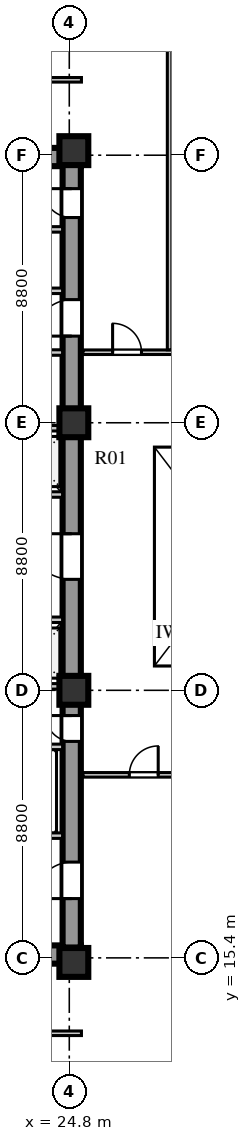
"""IFC4 building model, lengths in metres.
Left out: names, types, materials, properties, quantities, classifications, styles, units other than length and angle.
Written with IfcOpenShell. Run it as: python <this file> out.ifc"""

import sys

from ifc_helpers import new_model, si_unit, direction, frame, frame_2d, origin, origin_2d, place, context, subcontext, project, spatial, rectangle, extrude, element, fill, save


model = new_model("IFC4")
c1 = context("Model", 3, precision=1e-05, world=origin(), true_north=direction((0.0, 1.0)))
c2 = subcontext(c1, "Body", "Model", "MODEL_VIEW")
j1 = project(units=[si_unit("LENGTHUNIT", "METRE"), si_unit("PLANEANGLEUNIT", "RADIAN")], contexts=[c1])
p1 = place(None, origin())
s1 = spatial("IfcSite", under=j1, at=p1, CompositionType="ELEMENT")
p2 = place(p1, origin())
s2 = spatial("IfcBuilding", under=s1, at=p2, CompositionType="ELEMENT")
p3 = place(p2, frame((0.0, 0.0, 50.0)))
s3 = spatial("IfcBuildingStorey", under=s2, at=p3, CompositionType="ELEMENT", Elevation=50.0)
for number, where, z_axis, x_axis in (
    (1, (15.3, 15.51, 0.0), (0.0, 0.0, 1.0), (1.0, 0.0, 0.0)),
    (2, (15.3, 41.74, 0.0), (0.0, 0.0, 1.0), (1.0, 0.0, 0.0)),
):
    element("IfcWall", number, at=place(p3, frame(where, z_axis=z_axis, x_axis=x_axis)), inside=s3, PredefinedType="SHEAR", context=c2, shape_type="SweptSolid", body=[
        extrude(rectangle(XDim=9.88, YDim=0.6, at=frame_2d((4.94, 0.0))), origin(), (0.0, 0.0, 1.0), 3.72),
    ])
p4 = place(p3, frame((24.88, 15.74, 0.0), z_axis=(0.0, 0.0, 1.0), x_axis=(0.0, 1.0, 0.0)))
e3 = element("IfcWall", 3, at=p4, inside=s3, PredefinedType="SHEAR", context=c2, shape_type="SweptSolid", body=[
    extrude(rectangle(XDim=25.76, YDim=0.6, at=frame_2d((12.88, 0.0))), origin(), (0.0, 0.0, 1.0), 3.72),
])
p5 = place(p4, frame((1.61, 0.0, 0.0)))
e4 = element("IfcOpeningElement", 4, at=p5, cuts=e3, PredefinedType="OPENING", context=c2, shape_type="SweptSolid", body=[
    extrude(rectangle(XDim=1.2, YDim=2.1, at=frame_2d((0.6, 1.05))), frame((0.0, 0.31, 0.0), z_axis=(0.0, -1.0, 0.0), x_axis=(1.0, 0.0, 0.0)), (0.0, 0.0, 1.0), 0.62),
])
p6 = place(p4, frame((6.78, 0.0, 0.0)))
e5 = element("IfcOpeningElement", 5, at=p6, cuts=e3, PredefinedType="OPENING", context=c2, shape_type="SweptSolid", body=[
    extrude(rectangle(XDim=0.85, YDim=2.06, at=frame_2d((0.425, 1.03))), frame((0.0, 0.31, 0.0), z_axis=(0.0, -1.0, 0.0), x_axis=(1.0, 0.0, 0.0)), (0.0, 0.0, 1.0), 0.62),
])
p7 = place(p4, frame((12.11, 0.0, 0.0)))
e6 = element("IfcOpeningElement", 6, at=p7, cuts=e3, PredefinedType="OPENING", context=c2, shape_type="SweptSolid", body=[
    extrude(rectangle(XDim=1.5, YDim=2.12, at=frame_2d((0.75, 1.06))), frame((0.0, 0.31, 0.0), z_axis=(0.0, -1.0, 0.0), x_axis=(1.0, 0.0, 0.0)), (0.0, 0.0, 1.0), 0.62),
])
p8 = place(p4, frame((20.11, 0.0, 0.0)))
e7 = element("IfcOpeningElement", 7, at=p8, cuts=e3, PredefinedType="OPENING", context=c2, shape_type="SweptSolid", body=[
    extrude(rectangle(XDim=1.2, YDim=2.12, at=frame_2d((0.6, 1.06))), frame((0.0, 0.31, 0.0), z_axis=(0.0, -1.0, 0.0), x_axis=(1.0, 0.0, 0.0)), (0.0, 0.0, 1.0), 0.62),
])
p9 = place(p4, frame((24.01, 0.0, 0.0)))
e8 = element("IfcOpeningElement", 8, at=p9, cuts=e3, PredefinedType="OPENING", context=c2, shape_type="SweptSolid", body=[
    extrude(rectangle(XDim=0.95, YDim=2.1, at=frame_2d((0.475, 1.05))), frame((0.0, 0.31, 0.0), z_axis=(0.0, -1.0, 0.0), x_axis=(1.0, 0.0, 0.0)), (0.0, 0.0, 1.0), 0.62),
])
for number, where, z_axis, x_axis in (
    (9, (24.95, 15.25, 0.0), (0.0, 0.0, 1.0), (1.0, 0.0, 0.0)),
    (10, (24.95, 24.2, 0.0), (0.0, 0.0, 1.0), (1.0, 0.0, 0.0)),
    (11, (24.95, 33.0, 0.0), (0.0, 0.0, 1.0), (1.0, 0.0, 0.0)),
    (12, (24.95, 41.95, 0.0), (0.0, 0.0, 1.0), (1.0, 0.0, 0.0)),
):
    element("IfcColumn", number, at=place(p3, frame(where, z_axis=z_axis, x_axis=x_axis)), inside=s3, PredefinedType="COLUMN", context=c2, shape_type="SweptSolid", body=[
        extrude(rectangle(XDim=0.95, YDim=0.95, at=origin_2d()), origin(), (0.0, 0.0, 1.0), 3.72),
    ])
p10 = place(p3, frame((19.64, 19.42, 0.0), z_axis=(0.0, 0.0, 1.0), x_axis=(1.0, 0.0, 0.0)))
e13 = element("IfcWall", 13, at=p10, inside=s3, PredefinedType="SOLIDWALL", context=c2, shape_type="SweptSolid", body=[
    extrude(rectangle(XDim=4.94, YDim=0.18, at=frame_2d((2.47, 0.0))), origin(), (0.0, 0.0, 1.0), 3.72),
])
p11 = place(p10, frame((0.72, 0.0, 0.0)))
e14 = element("IfcOpeningElement", 14, at=p11, cuts=e13, PredefinedType="OPENING", context=c2, shape_type="SweptSolid", body=[
    extrude(rectangle(XDim=1.1, YDim=2.1, at=frame_2d((0.55, 1.05))), frame((0.0, 0.1, 0.0), z_axis=(0.0, -1.0, 0.0), x_axis=(1.0, 0.0, 0.0)), (0.0, 0.0, 1.0), 0.2),
])
p12 = place(p10, frame((3.02, 0.0, 0.0)))
e15 = element("IfcOpeningElement", 15, at=p12, cuts=e13, PredefinedType="OPENING", context=c2, shape_type="SweptSolid", body=[
    extrude(rectangle(XDim=1.1, YDim=2.1, at=frame_2d((0.55, 1.05))), frame((0.0, 0.1, 0.0), z_axis=(0.0, -1.0, 0.0), x_axis=(1.0, 0.0, 0.0)), (0.0, 0.0, 1.0), 0.2),
])
p13 = place(p3, frame((19.64, 22.34, 0.0), z_axis=(0.0, 0.0, 1.0), x_axis=(1.0, 0.0, 0.0)))
e16 = element("IfcWall", 16, at=p13, inside=s3, PredefinedType="SOLIDWALL", context=c2, shape_type="SweptSolid", body=[
    extrude(rectangle(XDim=4.94, YDim=0.18, at=frame_2d((2.47, 0.0))), origin(), (0.0, 0.0, 1.0), 3.72),
])
p14 = place(p3, frame((15.9, 26.52, 0.0), z_axis=(0.0, 0.0, 1.0), x_axis=(1.0, 0.0, 0.0)))
e17 = element("IfcWall", 17, at=p14, inside=s3, PredefinedType="SOLIDWALL", context=c2, shape_type="SweptSolid", body=[
    extrude(rectangle(XDim=8.68, YDim=0.18, at=frame_2d((4.34, 0.0))), origin(), (0.0, 0.0, 1.0), 3.72),
])
p15 = place(p14, frame((1.76, 0.0, 0.0)))
e18 = element("IfcOpeningElement", 18, at=p15, cuts=e17, PredefinedType="OPENING", context=c2, shape_type="SweptSolid", body=[
    extrude(rectangle(XDim=1.0, YDim=2.1, at=frame_2d((0.5, 1.05))), frame((0.0, 0.1, 0.0), z_axis=(0.0, -1.0, 0.0), x_axis=(1.0, 0.0, 0.0)), (0.0, 0.0, 1.0), 0.2),
])
p16 = place(p14, frame((3.6, 0.0, 0.0)))
e19 = element("IfcOpeningElement", 19, at=p16, cuts=e17, PredefinedType="OPENING", context=c2, shape_type="SweptSolid", body=[
    extrude(rectangle(XDim=1.0, YDim=2.1, at=frame_2d((0.5, 1.05))), frame((0.0, 0.1, 0.0), z_axis=(0.0, -1.0, 0.0), x_axis=(1.0, 0.0, 0.0)), (0.0, 0.0, 1.0), 0.2),
])
p17 = place(p14, frame((5.44, 0.0, 0.0)))
e20 = element("IfcOpeningElement", 20, at=p17, cuts=e17, PredefinedType="OPENING", context=c2, shape_type="SweptSolid", body=[
    extrude(rectangle(XDim=1.0, YDim=2.1, at=frame_2d((0.5, 1.05))), frame((0.0, 0.1, 0.0), z_axis=(0.0, -1.0, 0.0), x_axis=(1.0, 0.0, 0.0)), (0.0, 0.0, 1.0), 0.2),
])
p18 = place(p14, frame((7.28, 0.0, 0.0)))
e21 = element("IfcOpeningElement", 21, at=p18, cuts=e17, PredefinedType="OPENING", context=c2, shape_type="SweptSolid", body=[
    extrude(rectangle(XDim=1.0, YDim=2.1, at=frame_2d((0.5, 1.05))), frame((0.0, 0.1, 0.0), z_axis=(0.0, -1.0, 0.0), x_axis=(1.0, 0.0, 0.0)), (0.0, 0.0, 1.0), 0.2),
])
p19 = place(p3, frame((15.9, 24.33, 0.0), z_axis=(0.0, 0.0, 1.0), x_axis=(1.0, 0.0, 0.0)))
e22 = element("IfcWall", 22, at=p19, inside=s3, PredefinedType="SOLIDWALL", context=c2, shape_type="SweptSolid", body=[
    extrude(rectangle(XDim=8.68, YDim=0.18, at=frame_2d((4.34, 0.0))), origin(), (0.0, 0.0, 1.0), 3.02),
])
p20 = place(p3, frame((15.9, 30.64, 0.0), z_axis=(0.0, 0.0, 1.0), x_axis=(1.0, 0.0, 0.0)))
e23 = element("IfcWall", 23, at=p20, inside=s3, PredefinedType="SOLIDWALL", context=c2, shape_type="SweptSolid", body=[
    extrude(rectangle(XDim=8.68, YDim=0.18, at=frame_2d((4.34, 0.0))), origin(), (0.0, 0.0, 1.0), 3.72),
])
p21 = place(p20, frame((1.76, 0.0, 0.0)))
e24 = element("IfcOpeningElement", 24, at=p21, cuts=e23, PredefinedType="OPENING", context=c2, shape_type="SweptSolid", body=[
    extrude(rectangle(XDim=1.0, YDim=2.1, at=frame_2d((0.5, 1.05))), frame((0.0, 0.1, 0.0), z_axis=(0.0, -1.0, 0.0), x_axis=(1.0, 0.0, 0.0)), (0.0, 0.0, 1.0), 0.2),
])
p22 = place(p20, frame((3.6, 0.0, 0.0)))
e25 = element("IfcOpeningElement", 25, at=p22, cuts=e23, PredefinedType="OPENING", context=c2, shape_type="SweptSolid", body=[
    extrude(rectangle(XDim=1.0, YDim=2.1, at=frame_2d((0.5, 1.05))), frame((0.0, 0.1, 0.0), z_axis=(0.0, -1.0, 0.0), x_axis=(1.0, 0.0, 0.0)), (0.0, 0.0, 1.0), 0.2),
])
p23 = place(p20, frame((5.44, 0.0, 0.0)))
e26 = element("IfcOpeningElement", 26, at=p23, cuts=e23, PredefinedType="OPENING", context=c2, shape_type="SweptSolid", body=[
    extrude(rectangle(XDim=1.0, YDim=2.1, at=frame_2d((0.5, 1.05))), frame((0.0, 0.1, 0.0), z_axis=(0.0, -1.0, 0.0), x_axis=(1.0, 0.0, 0.0)), (0.0, 0.0, 1.0), 0.2),
])
p24 = place(p20, frame((7.28, 0.0, 0.0)))
e27 = element("IfcOpeningElement", 27, at=p24, cuts=e23, PredefinedType="OPENING", context=c2, shape_type="SweptSolid", body=[
    extrude(rectangle(XDim=1.0, YDim=2.1, at=frame_2d((0.5, 1.05))), frame((0.0, 0.1, 0.0), z_axis=(0.0, -1.0, 0.0), x_axis=(1.0, 0.0, 0.0)), (0.0, 0.0, 1.0), 0.2),
])
p25 = place(p3, frame((15.9, 32.82, 0.0), z_axis=(0.0, 0.0, 1.0), x_axis=(1.0, 0.0, 0.0)))
e28 = element("IfcWall", 28, at=p25, inside=s3, PredefinedType="SOLIDWALL", context=c2, shape_type="SweptSolid", body=[
    extrude(rectangle(XDim=8.68, YDim=0.18, at=frame_2d((4.34, 0.0))), origin(), (0.0, 0.0, 1.0), 3.02),
])
p26 = place(p3, frame((22.02, 35.31, 0.0), z_axis=(0.0, 0.0, 1.0), x_axis=(1.0, 0.0, 0.0)))
e29 = element("IfcWall", 29, at=p26, inside=s3, PredefinedType="SOLIDWALL", context=c2, shape_type="SweptSolid", body=[
    extrude(rectangle(XDim=2.56, YDim=0.18, at=frame_2d((1.28, 0.0))), origin(), (0.0, 0.0, 1.0), 3.72),
])
p27 = place(p26, frame((0.55, 0.0, 0.0)))
e30 = element("IfcOpeningElement", 30, at=p27, cuts=e29, PredefinedType="OPENING", context=c2, shape_type="SweptSolid", body=[
    extrude(rectangle(XDim=1.0, YDim=2.1, at=frame_2d((0.5, 1.05))), frame((0.0, 0.1, 0.0), z_axis=(0.0, -1.0, 0.0), x_axis=(1.0, 0.0, 0.0)), (0.0, 0.0, 1.0), 0.2),
])
p28 = place(p3, frame((19.64, 37.34, 0.0), z_axis=(0.0, 0.0, 1.0), x_axis=(1.0, 0.0, 0.0)))
e31 = element("IfcWall", 31, at=p28, inside=s3, PredefinedType="SOLIDWALL", context=c2, shape_type="SweptSolid", body=[
    extrude(rectangle(XDim=4.94, YDim=0.18, at=frame_2d((2.47, 0.0))), origin(), (0.0, 0.0, 1.0), 3.72),
])
p29 = place(p28, frame((0.45, 0.0, 0.0)))
e32 = element("IfcOpeningElement", 32, at=p29, cuts=e31, PredefinedType="OPENING", context=c2, shape_type="SweptSolid", body=[
    extrude(rectangle(XDim=1.0, YDim=2.1, at=frame_2d((0.5, 1.05))), frame((0.0, 0.1, 0.0), z_axis=(0.0, -1.0, 0.0), x_axis=(1.0, 0.0, 0.0)), (0.0, 0.0, 1.0), 0.2),
])
p30 = place(p28, frame((2.5, 0.0, 0.0)))
e33 = element("IfcOpeningElement", 33, at=p30, cuts=e31, PredefinedType="OPENING", context=c2, shape_type="SweptSolid", body=[
    extrude(rectangle(XDim=1.0, YDim=2.1, at=frame_2d((0.5, 1.05))), frame((0.0, 0.1, 0.0), z_axis=(0.0, -1.0, 0.0), x_axis=(1.0, 0.0, 0.0)), (0.0, 0.0, 1.0), 0.2),
])
p31 = place(p3, frame((19.64, 39.36, 0.0), z_axis=(0.0, 0.0, 1.0), x_axis=(1.0, 0.0, 0.0)))
e34 = element("IfcWall", 34, at=p31, inside=s3, PredefinedType="SOLIDWALL", context=c2, shape_type="SweptSolid", body=[
    extrude(rectangle(XDim=4.94, YDim=0.18, at=frame_2d((2.47, 0.0))), origin(), (0.0, 0.0, 1.0), 3.72),
])
p32 = place(p3, frame((25.25, 21.42, 0.0), z_axis=(0.0, 0.0, 1.0), x_axis=(1.0, 0.0, 0.0)))
e35 = element("IfcWall", 35, at=p32, inside=s3, PredefinedType="PARTITIONING", context=c2, shape_type="SweptSolid", body=[
    extrude(rectangle(XDim=12.87, YDim=0.15, at=frame_2d((6.435, 0.0))), origin(), (0.0, 0.0, 1.0), 3.32),
])
p33 = place(p32, frame((1.525, 0.0, 0.0)))
e36 = element("IfcOpeningElement", 36, at=p33, cuts=e35, PredefinedType="OPENING", context=c2, shape_type="SweptSolid", body=[
    extrude(rectangle(XDim=0.95, YDim=2.08, at=frame_2d((0.475, 1.04))), frame((0.0, 0.085, 0.0), z_axis=(0.0, -1.0, 0.0), x_axis=(1.0, 0.0, 0.0)), (0.0, 0.0, 1.0), 0.17),
])
p34 = place(p32, frame((5.775, 0.0, 0.0)))
e37 = element("IfcOpeningElement", 37, at=p34, cuts=e35, PredefinedType="OPENING", context=c2, shape_type="SweptSolid", body=[
    extrude(rectangle(XDim=0.95, YDim=2.08, at=frame_2d((0.475, 1.04))), frame((0.0, 0.085, 0.0), z_axis=(0.0, -1.0, 0.0), x_axis=(1.0, 0.0, 0.0)), (0.0, 0.0, 1.0), 0.17),
])
p35 = place(p32, frame((10.195, 0.0, 0.0)))
e38 = element("IfcOpeningElement", 38, at=p35, cuts=e35, PredefinedType="OPENING", context=c2, shape_type="SweptSolid", body=[
    extrude(rectangle(XDim=0.95, YDim=2.08, at=frame_2d((0.475, 1.04))), frame((0.0, 0.085, 0.0), z_axis=(0.0, -1.0, 0.0), x_axis=(1.0, 0.0, 0.0)), (0.0, 0.0, 1.0), 0.17),
])
p36 = place(p3, frame((25.25, 35.32, 0.0), z_axis=(0.0, 0.0, 1.0), x_axis=(1.0, 0.0, 0.0)))
e39 = element("IfcWall", 39, at=p36, inside=s3, PredefinedType="PARTITIONING", context=c2, shape_type="SweptSolid", body=[
    extrude(rectangle(XDim=9.47, YDim=0.15, at=frame_2d((4.735, 0.0))), origin(), (0.0, 0.0, 1.0), 3.72),
])
p37 = place(p36, frame((0.975, 0.0, 0.0)))
e40 = element("IfcOpeningElement", 40, at=p37, cuts=e39, PredefinedType="OPENING", context=c2, shape_type="SweptSolid", body=[
    extrude(rectangle(XDim=0.95, YDim=2.08, at=frame_2d((0.475, 1.04))), frame((0.0, 0.085, 0.0), z_axis=(0.0, -1.0, 0.0), x_axis=(1.0, 0.0, 0.0)), (0.0, 0.0, 1.0), 0.17),
])
p38 = place(p36, frame((4.025, 0.0, 0.0)))
e41 = element("IfcOpeningElement", 41, at=p38, cuts=e39, PredefinedType="OPENING", context=c2, shape_type="SweptSolid", body=[
    extrude(rectangle(XDim=0.95, YDim=2.08, at=frame_2d((0.475, 1.04))), frame((0.0, 0.085, 0.0), z_axis=(0.0, -1.0, 0.0), x_axis=(1.0, 0.0, 0.0)), (0.0, 0.0, 1.0), 0.17),
])
p39 = place(p36, frame((7.315, 0.0, 0.0)))
e42 = element("IfcOpeningElement", 42, at=p39, cuts=e39, PredefinedType="OPENING", context=c2, shape_type="SweptSolid", body=[
    extrude(rectangle(XDim=0.95, YDim=2.08, at=frame_2d((0.475, 1.04))), frame((0.0, 0.085, 0.0), z_axis=(0.0, -1.0, 0.0), x_axis=(1.0, 0.0, 0.0)), (0.0, 0.0, 1.0), 0.17),
])
p40 = place(p3, frame((10.5, 12.92, 0.0), z_axis=(0.0, 0.0, 1.0), x_axis=(1.0, 0.0, 0.0)))
e43 = element("IfcWall", 43, at=p40, inside=s3, PredefinedType="PARTITIONING", context=c2, shape_type="SweptSolid", body=[
    extrude(rectangle(XDim=14.7, YDim=0.15, at=frame_2d((7.35, 0.0))), origin(), (0.0, 0.0, 1.0), 3.72),
])
p41 = place(p40, frame((6.2, 0.0, 0.0)))
e44 = element("IfcOpeningElement", 44, at=p41, cuts=e43, PredefinedType="OPENING", context=c2, shape_type="SweptSolid", body=[
    extrude(rectangle(XDim=1.0, YDim=2.08, at=frame_2d((0.5, 1.04))), frame((0.0, 0.085, 0.0), z_axis=(0.0, -1.0, 0.0), x_axis=(1.0, 0.0, 0.0)), (0.0, 0.0, 1.0), 0.17),
])
p42 = place(p3, frame((10.5, 44.28, 0.0), z_axis=(0.0, 0.0, 1.0), x_axis=(1.0, 0.0, 0.0)))
e45 = element("IfcWall", 45, at=p42, inside=s3, PredefinedType="PARTITIONING", context=c2, shape_type="SweptSolid", body=[
    extrude(rectangle(XDim=14.7, YDim=0.15, at=frame_2d((7.35, 0.0))), origin(), (0.0, 0.0, 1.0), 3.72),
])
p43 = place(p42, frame((6.2, 0.0, 0.0)))
e46 = element("IfcOpeningElement", 46, at=p43, cuts=e45, PredefinedType="OPENING", context=c2, shape_type="SweptSolid", body=[
    extrude(rectangle(XDim=1.0, YDim=2.08, at=frame_2d((0.5, 1.04))), frame((0.0, 0.085, 0.0), z_axis=(0.0, -1.0, 0.0), x_axis=(1.0, 0.0, 0.0)), (0.0, 0.0, 1.0), 0.17),
])
p44 = place(p3, frame((28.1, 35.4, 0.0), z_axis=(0.0, 0.0, 1.0), x_axis=(0.0, 1.0, 0.0)))
e47 = element("IfcWall", 47, at=p44, inside=s3, PredefinedType="PARTITIONING", context=c2, shape_type="SweptSolid", body=[
    extrude(rectangle(XDim=14.92, YDim=0.15, at=frame_2d((7.46, 0.0))), origin(), (0.0, 0.0, 1.0), 3.72),
])
p45 = place(p5, frame((1.2, 0.0, 0.0), z_axis=(0.0, 0.0, 1.0), x_axis=(-1.0, 0.0, 0.0)))
e48 = element("IfcDoor", 48, at=p45, inside=s3, OperationType="SINGLE_SWING_RIGHT", PredefinedType="DOOR", context=c2, shape_type="SweptSolid", body=[
    extrude(rectangle(XDim=1.2, YDim=2.1, at=frame_2d((0.6, 1.05))), frame((0.0, 0.025, 0.0), z_axis=(0.0, -1.0, 0.0), x_axis=(1.0, 0.0, 0.0)), (0.0, 0.0, 1.0), 0.05),
])
fill(e4, e48)
p46 = place(p6, frame((0.85, 0.0, 0.0), z_axis=(0.0, 0.0, 1.0), x_axis=(-1.0, 0.0, 0.0)))
e49 = element("IfcDoor", 49, at=p46, inside=s3, OperationType="SINGLE_SWING_LEFT", PredefinedType="DOOR", context=c2, shape_type="SweptSolid", body=[
    extrude(rectangle(XDim=0.85, YDim=2.06, at=frame_2d((0.425, 1.03))), frame((0.0, 0.025, 0.0), z_axis=(0.0, -1.0, 0.0), x_axis=(1.0, 0.0, 0.0)), (0.0, 0.0, 1.0), 0.05),
])
fill(e5, e49)
p47 = place(p7, frame((1.5, 0.0, 0.0), z_axis=(0.0, 0.0, 1.0), x_axis=(-1.0, 0.0, 0.0)))
e50 = element("IfcDoor", 50, at=p47, inside=s3, OperationType="SINGLE_SWING_LEFT", PredefinedType="DOOR", context=c2, shape_type="SweptSolid", body=[
    extrude(rectangle(XDim=1.5, YDim=2.12, at=frame_2d((0.75, 1.06))), frame((0.0, 0.025, 0.0), z_axis=(0.0, -1.0, 0.0), x_axis=(1.0, 0.0, 0.0)), (0.0, 0.0, 1.0), 0.05),
])
fill(e6, e50)
p48 = place(p8, frame((1.2, 0.0, 0.0), z_axis=(0.0, 0.0, 1.0), x_axis=(-1.0, 0.0, 0.0)))
e51 = element("IfcDoor", 51, at=p48, inside=s3, OperationType="SINGLE_SWING_RIGHT", PredefinedType="DOOR", context=c2, shape_type="SweptSolid", body=[
    extrude(rectangle(XDim=1.2, YDim=2.12, at=frame_2d((0.6, 1.06))), frame((0.0, 0.025, 0.0), z_axis=(0.0, -1.0, 0.0), x_axis=(1.0, 0.0, 0.0)), (0.0, 0.0, 1.0), 0.05),
])
fill(e7, e51)
p49 = place(p9, frame((0.95, 0.0, 0.0), z_axis=(0.0, 0.0, 1.0), x_axis=(-1.0, 0.0, 0.0)))
e52 = element("IfcDoor", 52, at=p49, inside=s3, OperationType="SINGLE_SWING_LEFT", PredefinedType="DOOR", context=c2, shape_type="SweptSolid", body=[
    extrude(rectangle(XDim=0.95, YDim=2.1, at=frame_2d((0.475, 1.05))), frame((0.0, 0.025, 0.0), z_axis=(0.0, -1.0, 0.0), x_axis=(1.0, 0.0, 0.0)), (0.0, 0.0, 1.0), 0.05),
])
fill(e8, e52)
p50 = place(p33, frame((0.95, 0.0, 0.0), z_axis=(0.0, 0.0, 1.0), x_axis=(-1.0, 0.0, 0.0)))
e53 = element("IfcDoor", 53, at=p50, inside=s3, OperationType="SINGLE_SWING_LEFT", PredefinedType="DOOR", context=c2, shape_type="SweptSolid", body=[
    extrude(rectangle(XDim=0.95, YDim=2.08, at=frame_2d((0.475, 1.04))), frame((0.0, 0.025, 0.0), z_axis=(0.0, -1.0, 0.0), x_axis=(1.0, 0.0, 0.0)), (0.0, 0.0, 1.0), 0.05),
])
fill(e36, e53)
p51 = place(p37, origin())
e54 = element("IfcDoor", 54, at=p51, inside=s3, OperationType="SINGLE_SWING_LEFT", PredefinedType="DOOR", context=c2, shape_type="SweptSolid", body=[
    extrude(rectangle(XDim=0.95, YDim=2.08, at=frame_2d((0.475, 1.04))), frame((0.0, 0.025, 0.0), z_axis=(0.0, -1.0, 0.0), x_axis=(1.0, 0.0, 0.0)), (0.0, 0.0, 1.0), 0.05),
])
fill(e40, e54)
save(model, sys.argv[1])
